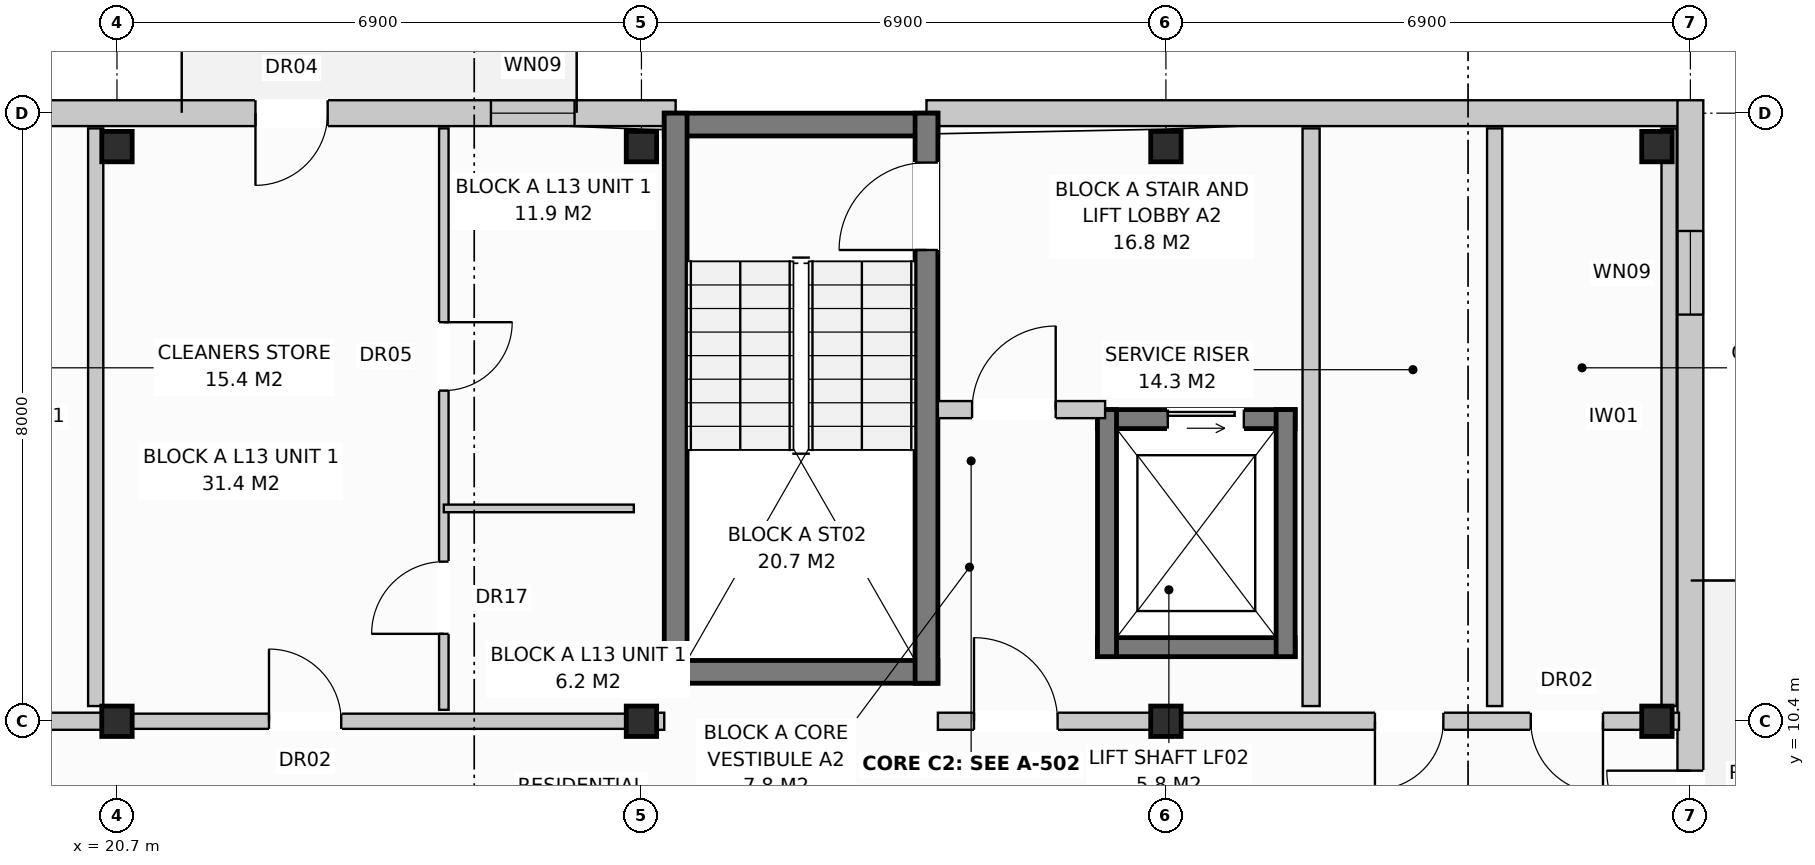
"""IFC4 building model, lengths in metres.
Left out: names, types, materials, properties, quantities, classifications, styles, units other than length and angle.
Written with IfcOpenShell. Run it as: python <this file> out.ifc"""

import sys

from ifc_helpers import new_model, si_unit, direction, frame, frame_2d, origin, origin_with_axes, origin_2d, place, context, subcontext, project, spatial, rectangle, extrude, element, fill, save


model = new_model("IFC4")
c1 = context("Model", 3, precision=1e-05, world=origin(), true_north=direction((0.0, 1.0)))
c2 = subcontext(c1, "Body", "Model", "MODEL_VIEW")
j1 = project(units=[si_unit("LENGTHUNIT", "METRE"), si_unit("PLANEANGLEUNIT", "RADIAN")], contexts=[c1])
p1 = place(None, origin())
s1 = spatial("IfcSite", under=j1, at=p1, CompositionType="ELEMENT")
p2 = place(p1, origin())
s2 = spatial("IfcBuilding", under=s1, at=p2, CompositionType="ELEMENT")
p3 = place(p2, frame((0.0, 0.0, 43.2)))
s3 = spatial("IfcBuildingStorey", under=s2, at=p3, CompositionType="ELEMENT", Elevation=43.2)
for number, where, z_axis, x_axis in (
    (1, (20.7, 10.4, 0.0), (0.0, 0.0, 1.0), (1.0, 0.0, 0.0)),
    (2, (20.7, 17.96, 0.0), (0.0, 0.0, 1.0), (1.0, 0.0, 0.0)),
    (3, (27.6, 10.4, 0.0), (0.0, 0.0, 1.0), (1.0, 0.0, 0.0)),
    (4, (27.6, 17.96, 0.0), (0.0, 0.0, 1.0), (1.0, 0.0, 0.0)),
    (5, (34.5, 10.4, 0.0), (0.0, 0.0, 1.0), (1.0, 0.0, 0.0)),
    (6, (34.5, 17.96, 0.0), (0.0, 0.0, 1.0), (1.0, 0.0, 0.0)),
    (7, (40.96, 10.4, 0.0), (0.0, 0.0, 1.0), (1.0, 0.0, 0.0)),
    (8, (40.96, 17.96, 0.0), (0.0, 0.0, 1.0), (1.0, 0.0, 0.0)),
):
    element("IfcColumn", number, at=place(p3, frame(where, z_axis=z_axis, x_axis=x_axis)), inside=s3, PredefinedType="COLUMN", context=c2, shape_type="SweptSolid", body=[
        extrude(rectangle(XDim=0.4, YDim=0.4, at=origin_2d()), origin(), (0.0, 0.0, 1.0), 3.2),
    ])
p4 = place(p3, frame((10.65, 18.4, 0.0), z_axis=(0.0, 0.0, 1.0), x_axis=(1.0, 0.0, 0.0)))
e9 = element("IfcWall", 9, at=p4, inside=s3, PredefinedType="STANDARD", context=c2, shape_type="SweptSolid", body=[
    extrude(rectangle(XDim=17.4, YDim=0.34, at=frame_2d((8.7, 0.0))), origin(), (0.0, 0.0, 1.0), 2.97),
])
p5 = place(p4, frame((11.872, 0.0, 0.0)))
e10 = element("IfcOpeningElement", 10, at=p5, cuts=e9, PredefinedType="OPENING", context=c2, shape_type="SweptSolid", body=[
    extrude(rectangle(XDim=0.95, YDim=2.1, at=frame_2d((0.475, 1.05))), frame((0.0, 0.182, 0.0), z_axis=(0.0, -1.0, 0.0), x_axis=(1.0, 0.0, 0.0)), (0.0, 0.0, 1.0), 0.364),
])
p6 = place(p4, frame((14.97, 0.0, 0.72)))
e11 = element("IfcOpeningElement", 11, at=p6, cuts=e9, PredefinedType="OPENING", context=c2, shape_type="SweptSolid", body=[
    extrude(rectangle(XDim=1.1, YDim=1.5, at=frame_2d((0.55, 0.75))), frame((0.0, 0.182, 0.0), z_axis=(0.0, -1.0, 0.0), x_axis=(1.0, 0.0, 0.0)), (0.0, 0.0, 1.0), 0.364),
])
p7 = place(p3, frame((31.35, 18.4, 0.0), z_axis=(0.0, 0.0, 1.0), x_axis=(1.0, 0.0, 0.0)))
e12 = element("IfcWall", 12, at=p7, inside=s3, PredefinedType="STANDARD", context=c2, shape_type="SweptSolid", body=[
    extrude(rectangle(XDim=9.89, YDim=0.34, at=frame_2d((4.945, 0.0))), origin(), (0.0, 0.0, 1.0), 2.97),
])
p8 = place(p3, frame((41.4, -0.17, 0.0), z_axis=(0.0, 0.0, 1.0), x_axis=(0.0, 1.0, 0.0)))
e13 = element("IfcWall", 13, at=p8, inside=s3, PredefinedType="STANDARD", context=c2, shape_type="SweptSolid", body=[
    extrude(rectangle(XDim=18.74, YDim=0.34, at=frame_2d((9.37, 0.0))), origin(), (0.0, 0.0, 1.0), 2.97),
])
p9 = place(p8, frame((8.82, 0.0, 0.0)))
e14 = element("IfcOpeningElement", 14, at=p9, cuts=e13, PredefinedType="OPENING", context=c2, shape_type="SweptSolid", body=[
    extrude(rectangle(XDim=1.1, YDim=2.1, at=frame_2d((0.55, 1.05))), frame((0.0, 0.182, 0.0), z_axis=(0.0, -1.0, 0.0), x_axis=(1.0, 0.0, 0.0)), (0.0, 0.0, 1.0), 0.364),
])
p10 = place(p8, frame((1.72, 0.0, 0.72)))
e15 = element("IfcOpeningElement", 15, at=p10, cuts=e13, PredefinedType="OPENING", context=c2, shape_type="SweptSolid", body=[
    extrude(rectangle(XDim=1.1, YDim=1.5, at=frame_2d((0.55, 0.75))), frame((0.0, 0.182, 0.0), z_axis=(0.0, -1.0, 0.0), x_axis=(1.0, 0.0, 0.0)), (0.0, 0.0, 1.0), 0.364),
])
p11 = place(p8, frame((15.92, 0.0, 0.72)))
e16 = element("IfcOpeningElement", 16, at=p11, cuts=e13, PredefinedType="OPENING", context=c2, shape_type="SweptSolid", body=[
    extrude(rectangle(XDim=1.1, YDim=1.5, at=frame_2d((0.55, 0.75))), frame((0.0, 0.182, 0.0), z_axis=(0.0, -1.0, 0.0), x_axis=(1.0, 0.0, 0.0)), (0.0, 0.0, 1.0), 0.364),
])
p12 = place(p3, frame((20.42, 10.6, 0.0), z_axis=(0.0, 0.0, 1.0), x_axis=(0.0, 1.0, 0.0)))
e17 = element("IfcWall", 17, at=p12, inside=s3, PredefinedType="PARTITIONING", context=c2, shape_type="SweptSolid", body=[
    extrude(rectangle(XDim=7.6, YDim=0.2, at=frame_2d((3.8, 0.0))), origin(), (0.0, 0.0, 1.0), 2.97),
])
p13 = place(p3, frame((10.8, 10.4, 0.0), z_axis=(0.0, 0.0, 1.0), x_axis=(1.0, 0.0, 0.0)))
e18 = element("IfcWall", 18, at=p13, inside=s3, PredefinedType="PARTITIONING", context=c2, shape_type="SweptSolid", body=[
    extrude(rectangle(XDim=9.9, YDim=0.225, at=frame_2d((4.95, 0.0))), origin(), (0.0, 0.0, 1.0), 2.41),
])
p14 = place(p13, frame((0.475, 0.0, 0.0)))
e19 = element("IfcOpeningElement", 19, at=p14, cuts=e18, PredefinedType="OPENING", context=c2, shape_type="SweptSolid", body=[
    extrude(rectangle(XDim=1.1, YDim=2.15, at=frame_2d((0.55, 1.075))), frame((0.0, 0.125, 0.0), z_axis=(0.0, -1.0, 0.0), x_axis=(1.0, 0.0, 0.0)), (0.0, 0.0, 1.0), 0.249),
])
p15 = place(p13, frame((5.75, 0.0, 0.0)))
e20 = element("IfcOpeningElement", 20, at=p15, cuts=e18, PredefinedType="OPENING", context=c2, shape_type="SweptSolid", body=[
    extrude(rectangle(XDim=0.9, YDim=2.1, at=frame_2d((0.45, 1.05))), frame((0.0, 0.125, 0.0), z_axis=(0.0, -1.0, 0.0), x_axis=(1.0, 0.0, 0.0)), (0.0, 0.0, 1.0), 0.249),
])
p16 = place(p13, frame((7.8, 0.0, 0.0)))
e21 = element("IfcOpeningElement", 21, at=p16, cuts=e18, PredefinedType="OPENING", context=c2, shape_type="SweptSolid", body=[
    extrude(rectangle(XDim=0.95, YDim=2.15, at=frame_2d((0.475, 1.075))), frame((0.0, 0.125, 0.0), z_axis=(0.0, -1.0, 0.0), x_axis=(1.0, 0.0, 0.0)), (0.0, 0.0, 1.0), 0.249),
])
for number, where, z_axis, x_axis in (
    (22, (27.9, 18.25, 0.0), (0.0, 0.0, 1.0), (1.0, 0.0, 0.0)),
    (23, (27.9, 11.05, 0.0), (0.0, 0.0, 1.0), (1.0, 0.0, 0.0)),
):
    element("IfcWall", number, at=place(p3, frame(where, z_axis=z_axis, x_axis=x_axis)), inside=s3, PredefinedType="SHEAR", context=c2, shape_type="SweptSolid", body=[
        extrude(rectangle(XDim=3.6, YDim=0.3, at=frame_2d((1.8, 0.0))), origin(), (0.0, 0.0, 1.0), 2.97),
    ])
p17 = place(p3, frame((28.05, 10.9, 0.0), z_axis=(0.0, 0.0, 1.0), x_axis=(0.0, 1.0, 0.0)))
e24 = element("IfcWall", 24, at=p17, inside=s3, PredefinedType="SHEAR", context=c2, shape_type="SweptSolid", body=[
    extrude(rectangle(XDim=7.5, YDim=0.3, at=frame_2d((3.75, 0.0))), origin(), (0.0, 0.0, 1.0), 2.97),
])
p18 = place(p3, frame((31.35, 10.9, 0.0), z_axis=(0.0, 0.0, 1.0), x_axis=(0.0, 1.0, 0.0)))
e25 = element("IfcWall", 25, at=p18, inside=s3, PredefinedType="SHEAR", context=c2, shape_type="SweptSolid", body=[
    extrude(rectangle(XDim=7.5, YDim=0.3, at=frame_2d((3.75, 0.0))), origin(), (0.0, 0.0, 1.0), 2.97),
])
p19 = place(p18, frame((5.7, 0.0, 0.0)))
e26 = element("IfcOpeningElement", 26, at=p19, cuts=e25, PredefinedType="OPENING", context=c2, shape_type="SweptSolid", body=[
    extrude(rectangle(XDim=1.15, YDim=2.15, at=frame_2d((0.575, 1.075))), frame((0.0, 0.162, 0.0), z_axis=(0.0, -1.0, 0.0), x_axis=(1.0, 0.0, 0.0)), (0.0, 0.0, 1.0), 0.324),
])
p20 = place(p3, frame((33.6, 14.375, 0.0), z_axis=(0.0, 0.0, 1.0), x_axis=(1.0, 0.0, 0.0)))
e27 = element("IfcWall", 27, at=p20, inside=s3, PredefinedType="SHEAR", context=c2, shape_type="SweptSolid", body=[
    extrude(rectangle(XDim=2.6, YDim=0.25, at=frame_2d((1.3, 0.0))), origin(), (0.0, 0.0, 1.0), 2.97),
])
p21 = place(p20, frame((0.925, 0.0, 0.0)))
e28 = element("IfcOpeningElement", 28, at=p21, cuts=e27, PredefinedType="OPENING", context=c2, shape_type="SweptSolid", body=[
    extrude(rectangle(XDim=1.0, YDim=2.1, at=frame_2d((0.5, 1.05))), frame((0.0, 0.137, 0.0), z_axis=(0.0, -1.0, 0.0), x_axis=(1.0, 0.0, 0.0)), (0.0, 0.0, 1.0), 0.274),
])
p22 = place(p3, frame((33.6, 11.375, 0.0), z_axis=(0.0, 0.0, 1.0), x_axis=(1.0, 0.0, 0.0)))
e29 = element("IfcWall", 29, at=p22, inside=s3, PredefinedType="SHEAR", context=c2, shape_type="SweptSolid", body=[
    extrude(rectangle(XDim=2.6, YDim=0.25, at=frame_2d((1.3, 0.0))), origin(), (0.0, 0.0, 1.0), 2.97),
])
for number, where, z_axis, x_axis in (
    (30, (33.725, 11.25, 0.0), (0.0, 0.0, 1.0), (0.0, 1.0, 0.0)),
    (31, (36.075, 11.25, 0.0), (0.0, 0.0, 1.0), (0.0, 1.0, 0.0)),
):
    element("IfcWall", number, at=place(p3, frame(where, z_axis=z_axis, x_axis=x_axis)), inside=s3, PredefinedType="SHEAR", context=c2, shape_type="SweptSolid", body=[
        extrude(rectangle(XDim=3.25, YDim=0.25, at=frame_2d((1.625, 0.0))), origin(), (0.0, 0.0, 1.0), 2.97),
    ])
p23 = place(p3, frame((36.41, 10.6, 0.0), z_axis=(0.0, 0.0, 1.0), x_axis=(0.0, 1.0, 0.0)))
e32 = element("IfcWall", 32, at=p23, inside=s3, PredefinedType="PARTITIONING", context=c2, shape_type="SweptSolid", body=[
    extrude(rectangle(XDim=7.6, YDim=0.225, at=frame_2d((3.8, 0.0))), origin(), (0.0, 0.0, 1.0), 2.97),
])
p24 = place(p3, frame((31.5, 14.5, 0.0), z_axis=(0.0, 0.0, 1.0), x_axis=(1.0, 0.0, 0.0)))
e33 = element("IfcWall", 33, at=p24, inside=s3, PredefinedType="PARTITIONING", context=c2, shape_type="SweptSolid", body=[
    extrude(rectangle(XDim=2.2, YDim=0.225, at=frame_2d((1.1, 0.0))), origin(), (0.0, 0.0, 1.0), 2.97),
])
p25 = place(p24, frame((0.45, 0.0, 0.0)))
e34 = element("IfcOpeningElement", 34, at=p25, cuts=e33, PredefinedType="OPENING", context=c2, shape_type="SweptSolid", body=[
    extrude(rectangle(XDim=1.1, YDim=2.15, at=frame_2d((0.55, 1.075))), frame((0.0, 0.125, 0.0), z_axis=(0.0, -1.0, 0.0), x_axis=(1.0, 0.0, 0.0)), (0.0, 0.0, 1.0), 0.249),
])
p26 = place(p3, frame((27.6, 10.4, 0.0), z_axis=(0.0, 0.0, 1.0), x_axis=(1.0, 0.0, 0.0)))
e35 = element("IfcWall", 35, at=p26, inside=s3, PredefinedType="PARTITIONING", context=c2, shape_type="SweptSolid", body=[
    extrude(rectangle(XDim=0.3, YDim=0.225, at=frame_2d((0.15, 0.0))), origin(), (0.0, 0.0, 1.0), 2.97),
])
p27 = place(p3, frame((38.825, 10.6, 0.0), z_axis=(0.0, 0.0, 1.0), x_axis=(0.0, 1.0, 0.0)))
e36 = element("IfcWall", 36, at=p27, inside=s3, PredefinedType="PARTITIONING", context=c2, shape_type="SweptSolid", body=[
    extrude(rectangle(XDim=7.6, YDim=0.2, at=frame_2d((3.8, 0.0))), origin(), (0.0, 0.0, 1.0), 2.97),
])
p28 = place(p3, frame((41.12, 10.6, 0.0), z_axis=(0.0, 0.0, 1.0), x_axis=(0.0, 1.0, 0.0)))
e37 = element("IfcWall", 37, at=p28, inside=s3, PredefinedType="PARTITIONING", context=c2, shape_type="SweptSolid", body=[
    extrude(rectangle(XDim=7.6, YDim=0.2, at=frame_2d((3.8, 0.0))), origin(), (0.0, 0.0, 1.0), 2.41),
])
p29 = place(p3, frame((31.5, 10.4, 0.0), z_axis=(0.0, 0.0, 1.0), x_axis=(1.0, 0.0, 0.0)))
e38 = element("IfcWall", 38, at=p29, inside=s3, PredefinedType="PARTITIONING", context=c2, shape_type="SweptSolid", body=[
    extrude(rectangle(XDim=9.75, YDim=0.225, at=frame_2d((4.875, 0.0))), origin(), (0.0, 0.0, 1.0), 2.41),
])
p30 = place(p29, frame((0.475, 0.0, 0.0)))
e39 = element("IfcOpeningElement", 39, at=p30, cuts=e38, PredefinedType="OPENING", context=c2, shape_type="SweptSolid", body=[
    extrude(rectangle(XDim=1.1, YDim=2.15, at=frame_2d((0.55, 1.075))), frame((0.0, 0.125, 0.0), z_axis=(0.0, -1.0, 0.0), x_axis=(1.0, 0.0, 0.0)), (0.0, 0.0, 1.0), 0.249),
])
p31 = place(p29, frame((5.75, 0.0, 0.0)))
e40 = element("IfcOpeningElement", 40, at=p31, cuts=e38, PredefinedType="OPENING", context=c2, shape_type="SweptSolid", body=[
    extrude(rectangle(XDim=0.9, YDim=2.1, at=frame_2d((0.45, 1.05))), frame((0.0, 0.125, 0.0), z_axis=(0.0, -1.0, 0.0), x_axis=(1.0, 0.0, 0.0)), (0.0, 0.0, 1.0), 0.249),
])
p32 = place(p29, frame((7.8, 0.0, 0.0)))
e41 = element("IfcOpeningElement", 41, at=p32, cuts=e38, PredefinedType="OPENING", context=c2, shape_type="SweptSolid", body=[
    extrude(rectangle(XDim=0.95, YDim=2.15, at=frame_2d((0.475, 1.075))), frame((0.0, 0.125, 0.0), z_axis=(0.0, -1.0, 0.0), x_axis=(1.0, 0.0, 0.0)), (0.0, 0.0, 1.0), 0.249),
])
p33 = place(p3, frame((20.7, 10.4, 0.0), z_axis=(0.0, 0.0, 1.0), x_axis=(1.0, 0.0, 0.0)))
e42 = element("IfcWall", 42, at=p33, inside=s3, PredefinedType="PARTITIONING", context=c2, shape_type="SweptSolid", body=[
    extrude(rectangle(XDim=6.9, YDim=0.2, at=frame_2d((3.45, 0.0))), origin(), (0.0, 0.0, 1.0), 2.41),
])
p34 = place(p33, frame((2.0, 0.0, 0.0)))
e43 = element("IfcOpeningElement", 43, at=p34, cuts=e42, PredefinedType="OPENING", context=c2, shape_type="SweptSolid", body=[
    extrude(rectangle(XDim=0.95, YDim=2.15, at=frame_2d((0.475, 1.075))), frame((0.0, 0.112, 0.0), z_axis=(0.0, -1.0, 0.0), x_axis=(1.0, 0.0, 0.0)), (0.0, 0.0, 1.0), 0.224),
])
p35 = place(p3, frame((25.0, 10.55, 0.0), z_axis=(0.0, 0.0, 1.0), x_axis=(0.0, 1.0, 0.0)))
e44 = element("IfcWall", 44, at=p35, inside=s3, PredefinedType="PARTITIONING", context=c2, shape_type="SweptSolid", body=[
    extrude(rectangle(XDim=7.65, YDim=0.125, at=frame_2d((3.825, 0.0))), origin(), (0.0, 0.0, 1.0), 2.97),
])
p36 = place(p35, frame((1.0, 0.0, 0.0)))
e45 = element("IfcOpeningElement", 45, at=p36, cuts=e44, PredefinedType="OPENING", context=c2, shape_type="SweptSolid", body=[
    extrude(rectangle(XDim=0.95, YDim=2.1, at=frame_2d((0.475, 1.05))), frame((0.0, 0.074, 0.0), z_axis=(0.0, -1.0, 0.0), x_axis=(1.0, 0.0, 0.0)), (0.0, 0.0, 1.0), 0.149),
])
p37 = place(p35, frame((4.2, 0.0, 0.0)))
e46 = element("IfcOpeningElement", 46, at=p37, cuts=e44, PredefinedType="OPENING", context=c2, shape_type="SweptSolid", body=[
    extrude(rectangle(XDim=0.9, YDim=2.1, at=frame_2d((0.45, 1.05))), frame((0.0, 0.074, 0.0), z_axis=(0.0, -1.0, 0.0), x_axis=(1.0, 0.0, 0.0)), (0.0, 0.0, 1.0), 0.149),
])
p38 = place(p3, frame((25.0, 13.2, 0.0), z_axis=(0.0, 0.0, 1.0), x_axis=(1.0, 0.0, 0.0)))
e47 = element("IfcWall", 47, at=p38, inside=s3, PredefinedType="PARTITIONING", context=c2, shape_type="SweptSolid", body=[
    extrude(rectangle(XDim=2.5, YDim=0.1, at=frame_2d((1.25, 0.0))), origin(), (0.0, 0.0, 1.0), 2.97),
])
p39 = place(p5, frame((0.95, 0.0, 0.0), z_axis=(0.0, 0.0, 1.0), x_axis=(-1.0, 0.0, 0.0)))
e48 = element("IfcDoor", 48, at=p39, inside=s3, OperationType="SINGLE_SWING_LEFT", PredefinedType="DOOR", context=c2, shape_type="SweptSolid", body=[
    extrude(rectangle(XDim=0.95, YDim=2.1, at=frame_2d((0.475, 1.05))), frame((0.0, 0.025, 0.0), z_axis=(0.0, -1.0, 0.0), x_axis=(1.0, 0.0, 0.0)), (0.0, 0.0, 1.0), 0.05),
])
fill(e10, e48)
p40 = place(p6, origin_with_axes())
e49 = element("IfcWindow", 49, at=p40, inside=s3, PartitioningType="SINGLE_PANEL", PredefinedType="WINDOW", context=c2, shape_type="SweptSolid", body=[
    extrude(rectangle(XDim=1.1, YDim=1.5, at=frame_2d((0.55, 0.75))), frame((0.0, 0.03, 0.0), z_axis=(0.0, -1.0, 0.0), x_axis=(1.0, 0.0, 0.0)), (0.0, 0.0, 1.0), 0.06),
])
fill(e11, e49)
p41 = place(p9, origin_with_axes())
e50 = element("IfcDoor", 50, at=p41, inside=s3, OperationType="SINGLE_SWING_RIGHT", PredefinedType="DOOR", context=c2, shape_type="SweptSolid", body=[
    extrude(rectangle(XDim=1.1, YDim=2.1, at=frame_2d((0.55, 1.05))), frame((0.0, 0.025, 0.0), z_axis=(0.0, -1.0, 0.0), x_axis=(1.0, 0.0, 0.0)), (0.0, 0.0, 1.0), 0.05),
])
fill(e14, e50)
p42 = place(p11, origin_with_axes())
e51 = element("IfcWindow", 51, at=p42, inside=s3, PartitioningType="SINGLE_PANEL", PredefinedType="WINDOW", context=c2, shape_type="SweptSolid", body=[
    extrude(rectangle(XDim=1.1, YDim=1.5, at=frame_2d((0.55, 0.75))), frame((0.0, 0.03, 0.0), z_axis=(0.0, -1.0, 0.0), x_axis=(1.0, 0.0, 0.0)), (0.0, 0.0, 1.0), 0.06),
])
fill(e16, e51)
p43 = place(p19, origin_with_axes())
e52 = element("IfcDoor", 52, at=p43, inside=s3, OperationType="SINGLE_SWING_LEFT", PredefinedType="DOOR", context=c2, shape_type="SweptSolid", body=[
    extrude(rectangle(XDim=1.15, YDim=2.15, at=frame_2d((0.575, 1.075))), frame((0.0, 0.025, 0.0), z_axis=(0.0, -1.0, 0.0), x_axis=(1.0, 0.0, 0.0)), (0.0, 0.0, 1.0), 0.05),
])
fill(e26, e52)
p44 = place(p21, origin_with_axes())
e53 = element("IfcDoor", 53, at=p44, inside=s3, OperationType="SLIDING_TO_LEFT", PredefinedType="DOOR", context=c2, shape_type="SweptSolid", body=[
    extrude(rectangle(XDim=1.0, YDim=2.1, at=frame_2d((0.5, 1.05))), frame((0.0, 0.025, 0.0), z_axis=(0.0, -1.0, 0.0), x_axis=(1.0, 0.0, 0.0)), (0.0, 0.0, 1.0), 0.05),
])
fill(e28, e53)
p45 = place(p25, origin_with_axes())
e54 = element("IfcDoor", 54, at=p45, inside=s3, OperationType="SINGLE_SWING_RIGHT", PredefinedType="DOOR", context=c2, shape_type="SweptSolid", body=[
    extrude(rectangle(XDim=1.1, YDim=2.15, at=frame_2d((0.55, 1.075))), frame((0.0, 0.025, 0.0), z_axis=(0.0, -1.0, 0.0), x_axis=(1.0, 0.0, 0.0)), (0.0, 0.0, 1.0), 0.05),
])
fill(e34, e54)
p46 = place(p30, origin_with_axes())
e55 = element("IfcDoor", 55, at=p46, inside=s3, OperationType="SINGLE_SWING_LEFT", PredefinedType="DOOR", context=c2, shape_type="SweptSolid", body=[
    extrude(rectangle(XDim=1.1, YDim=2.15, at=frame_2d((0.55, 1.075))), frame((0.0, 0.025, 0.0), z_axis=(0.0, -1.0, 0.0), x_axis=(1.0, 0.0, 0.0)), (0.0, 0.0, 1.0), 0.05),
])
fill(e39, e55)
p47 = place(p31, frame((0.9, 0.0, 0.0), z_axis=(0.0, 0.0, 1.0), x_axis=(-1.0, 0.0, 0.0)))
e56 = element("IfcDoor", 56, at=p47, inside=s3, OperationType="SINGLE_SWING_LEFT", PredefinedType="DOOR", context=c2, shape_type="SweptSolid", body=[
    extrude(rectangle(XDim=0.9, YDim=2.1, at=frame_2d((0.45, 1.05))), frame((0.0, 0.025, 0.0), z_axis=(0.0, -1.0, 0.0), x_axis=(1.0, 0.0, 0.0)), (0.0, 0.0, 1.0), 0.05),
])
fill(e40, e56)
p48 = place(p32, frame((0.95, 0.0, 0.0), z_axis=(0.0, 0.0, 1.0), x_axis=(-1.0, 0.0, 0.0)))
e57 = element("IfcDoor", 57, at=p48, inside=s3, OperationType="SINGLE_SWING_RIGHT", PredefinedType="DOOR", context=c2, shape_type="SweptSolid", body=[
    extrude(rectangle(XDim=0.95, YDim=2.15, at=frame_2d((0.475, 1.075))), frame((0.0, 0.025, 0.0), z_axis=(0.0, -1.0, 0.0), x_axis=(1.0, 0.0, 0.0)), (0.0, 0.0, 1.0), 0.05),
])
fill(e41, e57)
p49 = place(p34, origin_with_axes())
e58 = element("IfcDoor", 58, at=p49, inside=s3, OperationType="SINGLE_SWING_LEFT", PredefinedType="DOOR", context=c2, shape_type="SweptSolid", body=[
    extrude(rectangle(XDim=0.95, YDim=2.15, at=frame_2d((0.475, 1.075))), frame((0.0, 0.025, 0.0), z_axis=(0.0, -1.0, 0.0), x_axis=(1.0, 0.0, 0.0)), (0.0, 0.0, 1.0), 0.05),
])
fill(e43, e58)
p50 = place(p36, origin_with_axes())
e59 = element("IfcDoor", 59, at=p50, inside=s3, OperationType="SINGLE_SWING_LEFT", PredefinedType="DOOR", context=c2, shape_type="SweptSolid", body=[
    extrude(rectangle(XDim=0.95, YDim=2.1, at=frame_2d((0.475, 1.05))), frame((0.0, 0.025, 0.0), z_axis=(0.0, -1.0, 0.0), x_axis=(1.0, 0.0, 0.0)), (0.0, 0.0, 1.0), 0.05),
])
fill(e45, e59)
p51 = place(p37, frame((0.9, 0.0, 0.0), z_axis=(0.0, 0.0, 1.0), x_axis=(-1.0, 0.0, 0.0)))
e60 = element("IfcDoor", 60, at=p51, inside=s3, OperationType="SINGLE_SWING_RIGHT", PredefinedType="DOOR", context=c2, shape_type="SweptSolid", body=[
    extrude(rectangle(XDim=0.9, YDim=2.1, at=frame_2d((0.45, 1.05))), frame((0.0, 0.025, 0.0), z_axis=(0.0, -1.0, 0.0), x_axis=(1.0, 0.0, 0.0)), (0.0, 0.0, 1.0), 0.05),
])
fill(e46, e60)
save(model, sys.argv[1])
